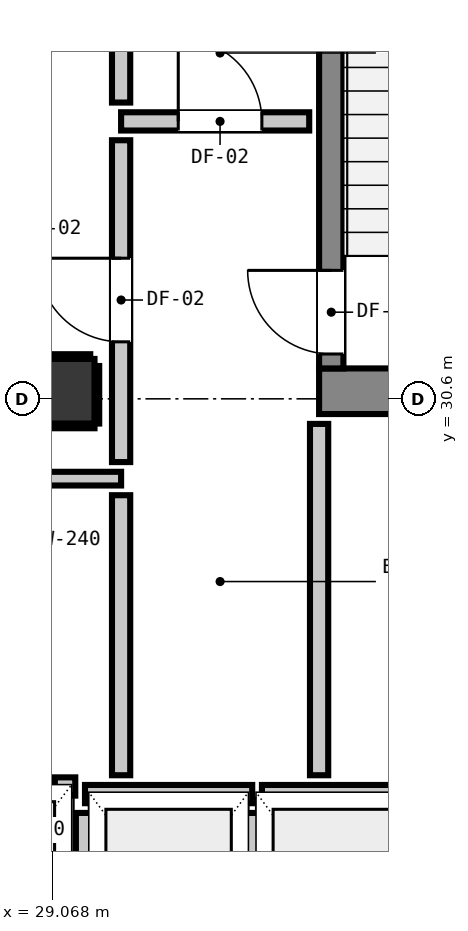
"""IFC4 building model, lengths in metres.
Left out: names, types, materials, properties, quantities, classifications, styles, units other than length and angle.
Written with IfcOpenShell. Run it as: python <this file> out.ifc"""

import sys

from ifc_helpers import new_model, si_unit, direction, frame, frame_2d, origin, origin_2d, place, context, subcontext, project, spatial, rectangle, extrude, element, fill, save


model = new_model("IFC4")
c1 = context("Model", 3, precision=1e-05, world=origin(), true_north=direction((0.0, 1.0)))
c2 = subcontext(c1, "Body", "Model", "MODEL_VIEW")
j1 = project(units=[si_unit("LENGTHUNIT", "METRE"), si_unit("PLANEANGLEUNIT", "RADIAN")], contexts=[c1])
p1 = place(None, origin())
s1 = spatial("IfcSite", under=j1, at=p1, CompositionType="ELEMENT")
p2 = place(p1, origin())
s2 = spatial("IfcBuilding", under=s1, at=p2, CompositionType="ELEMENT")
p3 = place(p2, frame((0.0, 0.0, 226.68)))
s3 = spatial("IfcBuildingStorey", under=s2, at=p3, CompositionType="ELEMENT", Elevation=226.68)
p4 = place(p3, frame((32.58, 30.7, 0.0), z_axis=(0.0, 0.0, 1.0), x_axis=(1.0, 0.0, 0.0)))
e1 = element("IfcWall", 1, at=p4, inside=s3, PredefinedType="SHEAR", context=c2, shape_type="SweptSolid", body=[
    extrude(rectangle(XDim=3.54, YDim=0.6, at=frame_2d((1.77, 0.0))), origin(), (0.0, 0.0, 1.0), 4.6),
])
p5 = place(p3, frame((32.74, 31.0, 0.0), z_axis=(0.0, 0.0, 1.0), x_axis=(0.0, 1.0, 0.0)))
e2 = element("IfcWall", 2, at=p5, inside=s3, PredefinedType="SHEAR", context=c2, shape_type="SweptSolid", body=[
    extrude(rectangle(XDim=7.8, YDim=0.32, at=frame_2d((3.9, 0.0))), origin(), (0.0, 0.0, 1.0), 4.6),
])
p6 = place(p5, frame((0.19, 0.0, 0.0)))
e3 = element("IfcOpeningElement", 3, at=p6, cuts=e2, PredefinedType="OPENING", context=c2, shape_type="SweptSolid", body=[
    extrude(rectangle(XDim=1.1, YDim=2.15, at=frame_2d((0.55, 1.075))), frame((0.0, 0.17, 0.0), z_axis=(0.0, -1.0, 0.0), x_axis=(1.0, 0.0, 0.0)), (0.0, 0.0, 1.0), 0.34),
])
p7 = place(p3, frame((29.2, 30.7, 0.0), z_axis=(0.0, 0.0, 1.0), x_axis=(1.0, 0.0, 0.0)))
e4 = element("IfcColumn", 4, at=p7, inside=s3, PredefinedType="COLUMN", context=c2, shape_type="SweptSolid", body=[
    extrude(rectangle(XDim=0.85, YDim=0.85, at=origin_2d()), origin(), (0.0, 0.0, 1.0), 4.6),
])
p8 = place(p3, frame((29.5, 25.4, 0.0), z_axis=(0.0, 0.0, 1.0), x_axis=(1.0, 0.0, 0.0)))
e5 = element("IfcWall", 5, at=p8, inside=s3, PredefinedType="PARTITIONING", context=c2, shape_type="SweptSolid", body=[
    extrude(rectangle(XDim=2.2, YDim=0.24, at=frame_2d((1.1, 0.0))), origin(), (0.0, 0.0, 1.0), 4.18),
])
p9 = place(p3, frame((29.5, 22.848, 0.0), z_axis=(0.0, 0.0, 1.0), x_axis=(0.0, 1.0, 0.0)))
e6 = element("IfcWall", 6, at=p9, inside=s3, PredefinedType="PARTITIONING", context=c2, shape_type="SweptSolid", body=[
    extrude(rectangle(XDim=2.304, YDim=0.24, at=frame_2d((1.152, 0.0))), origin(), (0.0, 0.0, 1.0), 2.185),
])
p10 = place(p3, frame((31.7, 22.848, 0.0), z_axis=(0.0, 0.0, 1.0), x_axis=(0.0, 1.0, 0.0)))
e7 = element("IfcWall", 7, at=p10, inside=s3, PredefinedType="PARTITIONING", context=c2, shape_type="SweptSolid", body=[
    extrude(rectangle(XDim=2.304, YDim=0.24, at=frame_2d((1.152, 0.0))), origin(), (0.0, 0.0, 1.0), 4.18),
])
p11 = place(p3, frame((31.828, 25.4, 0.0), z_axis=(0.0, 0.0, 1.0), x_axis=(1.0, 0.0, 0.0)))
e8 = element("IfcWall", 8, at=p11, inside=s3, PredefinedType="PARTITIONING", context=c2, shape_type="SweptSolid", body=[
    extrude(rectangle(XDim=2.072, YDim=0.24, at=frame_2d((1.036, 0.0))), origin(), (0.0, 0.0, 1.0), 4.18),
])
p12 = place(p3, frame((29.103, 25.5, 0.0), z_axis=(0.0, 0.0, 1.0), x_axis=(1.0, 0.0, 0.0)))
e9 = element("IfcWall", 9, at=p12, inside=s3, PredefinedType="PARTITIONING", context=c2, shape_type="SweptSolid", body=[
    extrude(rectangle(XDim=0.269, YDim=0.24, at=frame_2d((0.135, 0.0))), origin(), (0.0, 0.0, 1.0), 4.18),
])
p13 = place(p3, frame((29.975, 34.25, 0.0), z_axis=(0.0, 0.0, 1.0), x_axis=(1.0, 0.0, 0.0)))
e10 = element("IfcWall", 10, at=p13, inside=s3, PredefinedType="PARTITIONING", context=c2, shape_type="SweptSolid", body=[
    extrude(rectangle(XDim=2.475, YDim=0.24, at=frame_2d((1.237, 0.0))), origin(), (0.0, 0.0, 1.0), 4.18),
])
p14 = place(p13, frame((0.752, 0.0, 0.0)))
e11 = element("IfcOpeningElement", 11, at=p14, cuts=e10, PredefinedType="OPENING", context=c2, shape_type="SweptSolid", body=[
    extrude(rectangle(XDim=1.1, YDim=2.15, at=frame_2d((0.55, 1.075))), frame((0.0, 0.13, 0.0), z_axis=(0.0, -1.0, 0.0), x_axis=(1.0, 0.0, 0.0)), (0.0, 0.0, 1.0), 0.26),
])
p15 = place(p3, frame((28.593, 29.55, 0.0), z_axis=(0.0, 0.0, 1.0), x_axis=(1.0, 0.0, 0.0)))
e12 = element("IfcWall", 12, at=p15, inside=s3, PredefinedType="PARTITIONING", context=c2, shape_type="SweptSolid", body=[
    extrude(rectangle(XDim=1.382, YDim=0.18, at=frame_2d((0.691, 0.0))), origin(), (0.0, 0.0, 1.0), 4.18),
])
p16 = place(p3, frame((29.975, 25.648, 0.0), z_axis=(0.0, 0.0, 1.0), x_axis=(0.0, 1.0, 0.0)))
e13 = element("IfcWall", 13, at=p16, inside=s3, PredefinedType="PARTITIONING", context=c2, shape_type="SweptSolid", body=[
    extrude(rectangle(XDim=3.684, YDim=0.24, at=frame_2d((1.842, 0.0))), origin(), (0.0, 0.0, 1.0), 4.18),
])
p17 = place(p3, frame((29.975, 29.768, 0.0), z_axis=(0.0, 0.0, 1.0), x_axis=(0.0, 1.0, 0.0)))
e14 = element("IfcWall", 14, at=p17, inside=s3, PredefinedType="PARTITIONING", context=c2, shape_type="SweptSolid", body=[
    extrude(rectangle(XDim=4.234, YDim=0.24, at=frame_2d((2.117, 0.0))), origin(), (0.0, 0.0, 1.0), 4.18),
])
p18 = place(p17, frame((1.582, 0.0, 0.0)))
e15 = element("IfcOpeningElement", 15, at=p18, cuts=e14, PredefinedType="OPENING", context=c2, shape_type="SweptSolid", body=[
    extrude(rectangle(XDim=1.1, YDim=2.15, at=frame_2d((0.55, 1.075))), frame((0.0, 0.13, 0.0), z_axis=(0.0, -1.0, 0.0), x_axis=(1.0, 0.0, 0.0)), (0.0, 0.0, 1.0), 0.26),
])
p19 = place(p3, frame((29.975, 34.498, 0.0), z_axis=(0.0, 0.0, 1.0), x_axis=(0.0, 1.0, 0.0)))
e16 = element("IfcWall", 16, at=p19, inside=s3, PredefinedType="PARTITIONING", context=c2, shape_type="SweptSolid", body=[
    extrude(rectangle(XDim=0.934, YDim=0.24, at=frame_2d((0.467, 0.0))), origin(), (0.0, 0.0, 1.0), 4.18),
])
p20 = place(p3, frame((32.58, 25.648, 0.0), z_axis=(0.0, 0.0, 1.0), x_axis=(0.0, 1.0, 0.0)))
e17 = element("IfcWall", 17, at=p20, inside=s3, PredefinedType="PARTITIONING", context=c2, shape_type="SweptSolid", body=[
    extrude(rectangle(XDim=4.622, YDim=0.24, at=frame_2d((2.311, 0.0))), origin(), (0.0, 0.0, 1.0), 4.18),
])
p21 = place(p3, frame((28.775, 30.243, 0.0), z_axis=(0.0, 0.0, 1.0), x_axis=(1.0, 0.0, 0.0)))
e18 = element("IfcWall", 18, at=p21, inside=s3, PredefinedType="PARTITIONING", context=c2, shape_type="SweptSolid", body=[
    extrude(rectangle(XDim=0.85, YDim=0.06, at=frame_2d((0.425, 0.0))), origin(), (0.0, 0.0, 1.0), 1.45),
])
p22 = place(p3, frame((28.775, 31.157, 0.0), z_axis=(0.0, 0.0, 1.0), x_axis=(1.0, 0.0, 0.0)))
e19 = element("IfcWall", 19, at=p22, inside=s3, PredefinedType="PARTITIONING", context=c2, shape_type="SweptSolid", body=[
    extrude(rectangle(XDim=0.794, YDim=0.06, at=frame_2d((0.397, 0.0))), origin(), (0.0, 0.0, 1.0), 1.45),
])
p23 = place(p3, frame((29.657, 30.275, 0.0), z_axis=(0.0, 0.0, 1.0), x_axis=(0.0, 1.0, 0.0)))
e20 = element("IfcWall", 20, at=p23, inside=s3, PredefinedType="PARTITIONING", context=c2, shape_type="SweptSolid", body=[
    extrude(rectangle(XDim=0.757, YDim=0.06, at=frame_2d((0.378, 0.0))), origin(), (0.0, 0.0, 1.0), 1.45),
])
p24 = place(p6, origin())
e21 = element("IfcDoor", 21, at=p24, inside=s3, OperationType="SINGLE_SWING_RIGHT", PredefinedType="DOOR", context=c2, shape_type="SweptSolid", body=[
    extrude(rectangle(XDim=1.1, YDim=2.15, at=frame_2d((0.55, 1.075))), frame((0.0, 0.025, 0.0), z_axis=(0.0, -1.0, 0.0), x_axis=(1.0, 0.0, 0.0)), (0.0, 0.0, 1.0), 0.05),
])
fill(e3, e21)
p25 = place(p18, origin())
e22 = element("IfcDoor", 22, at=p25, inside=s3, OperationType="SINGLE_SWING_RIGHT", PredefinedType="DOOR", context=c2, shape_type="SweptSolid", body=[
    extrude(rectangle(XDim=1.1, YDim=2.15, at=frame_2d((0.55, 1.075))), frame((0.0, 0.025, 0.0), z_axis=(0.0, -1.0, 0.0), x_axis=(1.0, 0.0, 0.0)), (0.0, 0.0, 1.0), 0.05),
])
fill(e15, e22)
p26 = place(p14, origin())
e23 = element("IfcDoor", 23, at=p26, inside=s3, OperationType="SINGLE_SWING_LEFT", PredefinedType="DOOR", context=c2, shape_type="SweptSolid", body=[
    extrude(rectangle(XDim=1.1, YDim=2.15, at=frame_2d((0.55, 1.075))), frame((0.0, 0.025, 0.0), z_axis=(0.0, -1.0, 0.0), x_axis=(1.0, 0.0, 0.0)), (0.0, 0.0, 1.0), 0.05),
])
fill(e11, e23)
save(model, sys.argv[1])
